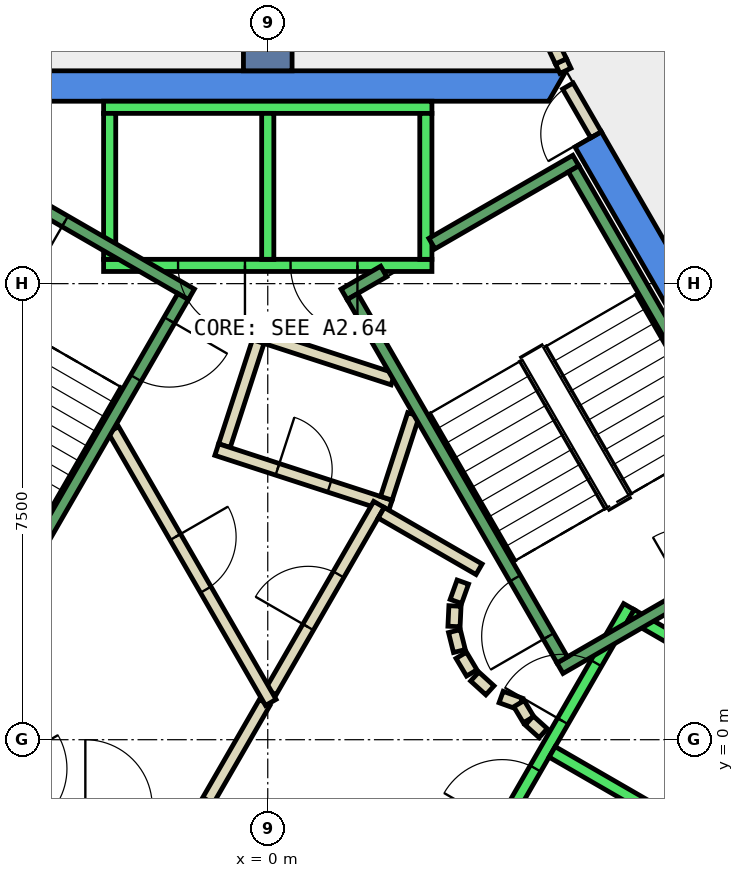
"""IFC4 building model, lengths in metres.
Left out: names, types, materials, properties, quantities, classifications, styles, units other than length and angle.
Written with IfcOpenShell. Run it as: python <this file> out.ifc"""

import sys

from ifc_helpers import new_model, si_unit, direction, frame, frame_2d, origin, place, context, subcontext, project, spatial, polyline, rectangle, outline, extrude, element, fill, save


model = new_model("IFC4")
c1 = context("Model", 3, precision=1e-05, world=origin(), true_north=direction((0.0, 1.0)))
c2 = subcontext(c1, "Body", "Model", "MODEL_VIEW")
j1 = project(units=[si_unit("LENGTHUNIT", "METRE"), si_unit("PLANEANGLEUNIT", "RADIAN")], contexts=[c1])
p1 = place(None, origin())
s1 = spatial("IfcSite", under=j1, at=p1, CompositionType="ELEMENT")
p2 = place(p1, origin())
s2 = spatial("IfcBuilding", under=s1, at=p2, CompositionType="ELEMENT")
p3 = place(p2, frame((0.0, 0.0, 304.4)))
s3 = spatial("IfcBuildingStorey", under=s2, at=p3, CompositionType="ELEMENT", Elevation=304.4)
p4 = place(p3, frame((0.0, 0.0, -0.34)))
e1 = element("IfcWall", 1, at=p4, inside=s3, PredefinedType="SHEAR", context=c2, shape_type="SweptSolid", body=[
    extrude(outline(polyline([(5.486, 9.998), (5.053, 9.748), (9.238, 2.5), (9.815, 2.5), (5.486, 9.998)])), origin(), (0.0, 0.0, 1.0), 3.6),
])
p5 = place(p3, frame((0.0, 0.0, -0.34)))
e2 = element("IfcWall", 2, at=p5, inside=s3, PredefinedType="SHEAR", context=c2, shape_type="SweptSolid", body=[
    extrude(outline(polyline([(4.907, 11.0), (-4.907, 11.0), (-4.619, 10.5), (4.619, 10.5), (4.907, 11.0)])), origin(), (0.0, 0.0, 1.0), 3.6),
])
p6 = place(p3, frame((0.0, 0.0, -0.34)))
e3 = element("IfcWall", 3, at=p6, inside=s3, PredefinedType="SHEAR", context=c2, shape_type="SweptSolid", body=[
    extrude(outline(polyline([(4.907, -6.0), (9.815, 2.5), (9.238, 2.5), (4.619, -5.5), (4.907, -6.0)])), origin(), (0.0, 0.0, 1.0), 3.6),
])
p7 = place(p3, frame((0.0, 11.0, -0.34), z_axis=(0.0, 0.0, 1.0), x_axis=(0.0, 1.0, 0.0)))
e4 = element("IfcWall", 4, at=p7, inside=s3, PredefinedType="SHEAR", context=c2, shape_type="SweptSolid", body=[
    extrude(rectangle(XDim=9.0, YDim=0.8, at=frame_2d((4.5, 0.0))), origin(), (0.0, 0.0, 1.0), 3.6),
])
p8 = place(p3, frame((2.06, 5.931, 0.0), z_axis=(0.0, 0.0, 1.0), x_axis=(-0.95092855133, 0.309410552932, 0.0)))
e5 = element("IfcWall", 5, at=p8, inside=s3, PredefinedType="PARTITIONING", context=c2, shape_type="SweptSolid", body=[
    extrude(rectangle(XDim=2.399, YDim=0.2, at=frame_2d((1.199, 0.0))), origin(), (0.0, 0.0, 1.0), 3.26),
])
p9 = place(p3, frame((-0.157, 6.547, 0.0), z_axis=(0.0, 0.0, 1.0), x_axis=(-0.308813127339, -0.951122732555, 0.0)))
e6 = element("IfcWall", 6, at=p9, inside=s3, PredefinedType="PARTITIONING", context=c2, shape_type="SweptSolid", body=[
    extrude(rectangle(XDim=1.8, YDim=0.2, at=frame_2d((0.9, 0.0))), origin(), (0.0, 0.0, 1.0), 3.26),
])
p10 = place(p3, frame((-0.839, 4.771, 0.0), z_axis=(0.0, 0.0, 1.0), x_axis=(0.950961084355, -0.309310549515, 0.0)))
e7 = element("IfcWall", 7, at=p10, inside=s3, PredefinedType="PARTITIONING", context=c2, shape_type="SweptSolid", body=[
    extrude(rectangle(XDim=3.0, YDim=0.2, at=frame_2d((1.5, 0.0))), origin(), (0.0, 0.0, 1.0), 3.26),
])
p11 = place(p10, frame((1.05, 0.0, 0.0)))
e8 = element("IfcOpeningElement", 8, at=p11, cuts=e7, PredefinedType="OPENING", context=c2, shape_type="SweptSolid", body=[
    extrude(rectangle(XDim=0.9, YDim=2.1, at=frame_2d((0.45, 1.05))), frame((0.0, 0.11, 0.0), z_axis=(0.0, -1.0, 0.0), x_axis=(1.0, 0.0, 0.0)), (0.0, 0.0, 1.0), 0.22),
])
p12 = place(p3, frame((1.95, 3.97, 0.0), z_axis=(0.0, 0.0, 1.0), x_axis=(0.308583003896, 0.951197418892, 0.0)))
e9 = element("IfcWall", 9, at=p12, inside=s3, PredefinedType="PARTITIONING", context=c2, shape_type="SweptSolid", body=[
    extrude(rectangle(XDim=1.449, YDim=0.2, at=frame_2d((0.724, 0.0))), origin(), (0.0, 0.0, 1.0), 3.26),
])
p13 = place(p3, frame((4.896, 11.0, 0.0), z_axis=(0.0, 0.0, 1.0), x_axis=(-0.428451014387, 0.903565010539, 0.0)))
e10 = element("IfcWall", 10, at=p13, inside=s3, PredefinedType="PARTITIONING", context=c2, shape_type="SweptSolid", body=[
    extrude(rectangle(XDim=0.173, YDim=0.2, at=frame_2d((0.086, 0.0))), origin(), (0.0, 0.0, 1.0), 2.4),
])
p14 = place(p3, frame((-2.969, 15.033, 0.0), z_axis=(0.0, 0.0, 1.0), x_axis=(-0.526330241425, -0.85028023437, 0.0)))
e11 = element("IfcWall", 11, at=p14, inside=s3, PredefinedType="PARTITIONING", context=c2, shape_type="SweptSolid", body=[
    extrude(rectangle(XDim=4.828, YDim=0.2, at=frame_2d((2.414, 0.0))), origin(), (0.0, 0.0, 1.0), 3.26),
])
p15 = place(p14, frame((1.514, 0.0, 0.0)))
e12 = element("IfcOpeningElement", 12, at=p15, cuts=e11, PredefinedType="OPENING", context=c2, shape_type="SweptSolid", body=[
    extrude(rectangle(XDim=1.8, YDim=2.1, at=frame_2d((0.9, 1.05))), frame((0.0, 0.11, 0.0), z_axis=(0.0, -1.0, 0.0), x_axis=(1.0, 0.0, 0.0)), (0.0, 0.0, 1.0), 0.22),
])
p16 = place(p3, frame((-0.982, -1.0, 0.0), z_axis=(0.0, 0.0, 1.0), x_axis=(0.50024047865, 0.865886518847, 0.0)))
e13 = element("IfcWall", 13, at=p16, inside=s3, PredefinedType="PARTITIONING", context=c2, shape_type="SweptSolid", body=[
    extrude(rectangle(XDim=1.863, YDim=0.2, at=frame_2d((0.931, 0.0))), origin(), (0.0, 0.0, 1.0), 3.26),
])
p17 = place(p3, frame((0.05, 0.787, 0.0), z_axis=(0.0, 0.0, 1.0), x_axis=(0.499954076797, 0.866051915934, 0.0)))
e14 = element("IfcWall", 14, at=p17, inside=s3, PredefinedType="PARTITIONING", context=c2, shape_type="SweptSolid", body=[
    extrude(rectangle(XDim=3.558, YDim=0.2, at=frame_2d((1.779, 0.0))), origin(), (0.0, 0.0, 1.0), 3.26),
])
p18 = place(p17, frame((1.229, 0.0, 0.0)))
e15 = element("IfcOpeningElement", 15, at=p18, cuts=e14, PredefinedType="OPENING", context=c2, shape_type="SweptSolid", body=[
    extrude(rectangle(XDim=1.0, YDim=2.1, at=frame_2d((0.5, 1.05))), frame((0.0, 0.11, 0.0), z_axis=(0.0, -1.0, 0.0), x_axis=(1.0, 0.0, 0.0)), (0.0, 0.0, 1.0), 0.22),
])
p19 = place(p3, frame((1.866, 3.732, 0.0), z_axis=(0.0, 0.0, 1.0), x_axis=(0.866043361281, -0.499968895414, 0.0)))
e16 = element("IfcWall", 16, at=p19, inside=s3, PredefinedType="PARTITIONING", context=c2, shape_type="SweptSolid", body=[
    extrude(rectangle(XDim=1.858, YDim=0.2, at=frame_2d((0.929, 0.0))), origin(), (0.0, 0.0, 1.0), 3.26),
])
p20 = place(p3, frame((3.208, 2.592, 0.0), z_axis=(0.0, 0.0, 1.0), x_axis=(-0.337388820924, -0.941365382578, 0.0)))
e17 = element("IfcWall", 17, at=p20, inside=s3, PredefinedType="PARTITIONING", context=c2, shape_type="SweptSolid", body=[
    extrude(rectangle(XDim=0.338, YDim=0.2, at=frame_2d((0.169, 0.0))), origin(), (0.0, 0.0, 1.0), 3.26),
])
p21 = place(p3, frame((3.079, 2.199, 0.0), z_axis=(0.0, 0.0, 1.0), x_axis=(-0.047771483479, -0.998858290933, 0.0)))
e18 = element("IfcWall", 18, at=p21, inside=s3, PredefinedType="PARTITIONING", context=c2, shape_type="SweptSolid", body=[
    extrude(rectangle(XDim=0.337, YDim=0.2, at=frame_2d((0.169, 0.0))), origin(), (0.0, 0.0, 1.0), 3.26),
])
p22 = place(p3, frame((3.07, 1.786, 0.0), z_axis=(0.0, 0.0, 1.0), x_axis=(0.242705583207, -0.970099994784, 0.0)))
e19 = element("IfcWall", 19, at=p22, inside=s3, PredefinedType="PARTITIONING", context=c2, shape_type="SweptSolid", body=[
    extrude(rectangle(XDim=0.338, YDim=0.2, at=frame_2d((0.169, 0.0))), origin(), (0.0, 0.0, 1.0), 3.26),
])
for number, where, z_axis, x_axis in (
    (20, (3.182, 1.388, 0.0), (0.0, 0.0, 1.0), (0.512, -0.859, 0.0)),
    (21, (3.404, 1.039, 0.0), (0.0, 0.0, 1.0), (0.74, -0.672, 0.0)),
):
    element("IfcWall", number, at=place(p3, frame(where, z_axis=z_axis, x_axis=x_axis)), inside=s3, PredefinedType="PARTITIONING", context=c2, shape_type="SweptSolid", body=[
        extrude(rectangle(XDim=0.338, YDim=0.2, at=frame_2d((0.169, 0.0))), origin(), (0.0, 0.0, 1.0), 3.26),
    ])
p23 = place(p3, frame((3.838, 0.702, 0.0), z_axis=(0.0, 0.0, 1.0), x_axis=(0.941035081519, -0.338308993895, 0.0)))
e22 = element("IfcWall", 22, at=p23, inside=s3, PredefinedType="PARTITIONING", context=c2, shape_type="SweptSolid", body=[
    extrude(rectangle(XDim=0.337, YDim=0.2, at=frame_2d((0.168, 0.0))), origin(), (0.0, 0.0, 1.0), 3.26),
])
p24 = place(p3, frame((4.132, 0.593, 0.0), z_axis=(0.0, 0.0, 1.0), x_axis=(0.513561617048, -0.858052717201, 0.0)))
e23 = element("IfcWall", 23, at=p24, inside=s3, PredefinedType="PARTITIONING", context=c2, shape_type="SweptSolid", body=[
    extrude(rectangle(XDim=0.308, YDim=0.2, at=frame_2d((0.154, 0.0))), origin(), (0.0, 0.0, 1.0), 3.26),
])
p25 = place(p3, frame((4.301, 0.315, 0.0), z_axis=(0.0, 0.0, 1.0), x_axis=(0.741798017506, -0.670623367639, 0.0)))
e24 = element("IfcWall", 24, at=p25, inside=s3, PredefinedType="PARTITIONING", context=c2, shape_type="SweptSolid", body=[
    extrude(rectangle(XDim=0.309, YDim=0.2, at=frame_2d((0.154, 0.0))), origin(), (0.0, 0.0, 1.0), 3.26),
])
p26 = place(p3, frame((-2.54, 5.1, 0.0), z_axis=(0.0, 0.0, 1.0), x_axis=(0.499925051871, -0.866068670783, 0.0)))
e25 = element("IfcWall", 25, at=p26, inside=s3, PredefinedType="PARTITIONING", context=c2, shape_type="SweptSolid", body=[
    extrude(rectangle(XDim=5.181, YDim=0.2, at=frame_2d((2.59, 0.0))), origin(), (0.0, 0.0, 1.0), 3.26),
])
p27 = place(p26, frame((2.04, 0.0, 0.0)))
e26 = element("IfcOpeningElement", 26, at=p27, cuts=e25, PredefinedType="OPENING", context=c2, shape_type="SweptSolid", body=[
    extrude(rectangle(XDim=1.0, YDim=2.1, at=frame_2d((0.5, 1.05))), frame((0.0, 0.11, 0.0), z_axis=(0.0, -1.0, 0.0), x_axis=(1.0, 0.0, 0.0)), (0.0, 0.0, 1.0), 0.22),
])
p28 = place(p3, frame((5.399, 9.948, 0.0), z_axis=(0.0, 0.0, 1.0), x_axis=(-0.499882215713, 0.866093395895, 0.0)))
e27 = element("IfcWall", 27, at=p28, inside=s3, PredefinedType="PARTITIONING", context=c2, shape_type="SweptSolid", body=[
    extrude(rectangle(XDim=0.926, YDim=0.2, at=frame_2d((0.463, 0.0))), origin(), (0.0, 0.0, 1.0), 2.4),
])
p29 = place(p28, frame((0.017, 0.0, 0.0)))
e28 = element("IfcOpeningElement", 28, at=p29, cuts=e27, PredefinedType="OPENING", context=c2, shape_type="SweptSolid", body=[
    extrude(rectangle(XDim=0.9, YDim=2.1, at=frame_2d((0.45, 1.05))), frame((0.0, 0.11, 0.0), z_axis=(0.0, -1.0, 0.0), x_axis=(1.0, 0.0, 0.0)), (0.0, 0.0, 1.0), 0.22),
])
p30 = place(p3, frame((4.822, 11.156, 0.0), z_axis=(0.0, 0.0, 1.0), x_axis=(-0.429057973289, 0.903276953961, 0.0)))
e29 = element("IfcWall", 29, at=p30, inside=s3, PredefinedType="PARTITIONING", context=c2, shape_type="SweptSolid", body=[
    extrude(rectangle(XDim=4.298, YDim=0.2, at=frame_2d((2.149, 0.0))), origin(), (0.0, 0.0, 1.0), 3.26),
])
p31 = place(p3, frame((2.7, 7.8, 0.0), z_axis=(0.0, 0.0, 1.0), x_axis=(-1.0, 0.0, 0.0)))
e30 = element("IfcWall", 30, at=p31, inside=s3, PredefinedType="STANDARD", context=c2, shape_type="SweptSolid", body=[
    extrude(rectangle(XDim=5.4, YDim=0.2, at=frame_2d((2.7, 0.0))), origin(), (0.0, 0.0, 1.0), 3.26),
])
p32 = place(p31, frame((1.225, 0.0, 0.0)))
e31 = element("IfcOpeningElement", 31, at=p32, cuts=e30, PredefinedType="OPENING", context=c2, shape_type="SweptSolid", body=[
    extrude(rectangle(XDim=1.1, YDim=2.1, at=frame_2d((0.55, 1.05))), frame((0.0, 0.11, 0.0), z_axis=(0.0, -1.0, 0.0), x_axis=(1.0, 0.0, 0.0)), (0.0, 0.0, 1.0), 0.22),
])
p33 = place(p31, frame((3.075, 0.0, 0.0)))
e32 = element("IfcOpeningElement", 32, at=p33, cuts=e30, PredefinedType="OPENING", context=c2, shape_type="SweptSolid", body=[
    extrude(rectangle(XDim=1.1, YDim=2.1, at=frame_2d((0.55, 1.05))), frame((0.0, 0.11, 0.0), z_axis=(0.0, -1.0, 0.0), x_axis=(1.0, 0.0, 0.0)), (0.0, 0.0, 1.0), 0.22),
])
p34 = place(p3, frame((2.7, 10.4, 0.0), z_axis=(0.0, 0.0, 1.0), x_axis=(-1.0, 0.0, 0.0)))
e33 = element("IfcWall", 33, at=p34, inside=s3, PredefinedType="STANDARD", context=c2, shape_type="SweptSolid", body=[
    extrude(rectangle(XDim=5.4, YDim=0.2, at=frame_2d((2.7, 0.0))), origin(), (0.0, 0.0, 1.0), 3.26),
])
for number, where, z_axis, x_axis in (
    (34, (2.6, 7.9, 0.0), (0.0, 0.0, 1.0), (0.0, 1.0, 0.0)),
    (35, (0.0, 7.9, 0.0), (0.0, 0.0, 1.0), (0.0, 1.0, 0.0)),
    (36, (-2.6, 7.9, 0.0), (0.0, 0.0, 1.0), (0.0, 1.0, 0.0)),
):
    element("IfcWall", number, at=place(p3, frame(where, z_axis=z_axis, x_axis=x_axis)), inside=s3, PredefinedType="STANDARD", context=c2, shape_type="SweptSolid", body=[
        extrude(rectangle(XDim=2.4, YDim=0.2, at=frame_2d((1.2, 0.0))), origin(), (0.0, 0.0, 1.0), 3.26),
    ])
p35 = place(p3, frame((-5.94, 2.188, 0.0), z_axis=(0.0, 0.0, 1.0), x_axis=(0.500034260056, -0.866005622828, 0.0)))
e37 = element("IfcWall", 37, at=p35, inside=s3, PredefinedType="STANDARD", context=c2, shape_type="SweptSolid", body=[
    extrude(rectangle(XDim=5.399, YDim=0.2, at=frame_2d((2.7, 0.0))), origin(), (0.0, 0.0, 1.0), 3.26),
])
p36 = place(p35, frame((3.075, 0.0, 0.0)))
e38 = element("IfcOpeningElement", 38, at=p36, cuts=e37, PredefinedType="OPENING", context=c2, shape_type="SweptSolid", body=[
    extrude(rectangle(XDim=1.1, YDim=2.1, at=frame_2d((0.55, 1.05))), frame((0.0, 0.11, 0.0), z_axis=(0.0, -1.0, 0.0), x_axis=(1.0, 0.0, 0.0)), (0.0, 0.0, 1.0), 0.22),
])
p37 = place(p35, frame((1.225, 0.0, 0.0)))
e39 = element("IfcOpeningElement", 39, at=p37, cuts=e37, PredefinedType="OPENING", context=c2, shape_type="SweptSolid", body=[
    extrude(rectangle(XDim=1.1, YDim=2.1, at=frame_2d((0.55, 1.05))), frame((0.0, 0.11, 0.0), z_axis=(0.0, -1.0, 0.0), x_axis=(1.0, 0.0, 0.0)), (0.0, 0.0, 1.0), 0.22),
])
p38 = place(p3, frame((3.24, -2.488, 0.0), z_axis=(0.0, 0.0, 1.0), x_axis=(0.500034260056, 0.866005622828, 0.0)))
e40 = element("IfcWall", 40, at=p38, inside=s3, PredefinedType="STANDARD", context=c2, shape_type="SweptSolid", body=[
    extrude(rectangle(XDim=5.399, YDim=0.2, at=frame_2d((2.7, 0.0))), origin(), (0.0, 0.0, 1.0), 3.26),
])
p39 = place(p38, frame((3.225, 0.0, 0.0)))
e41 = element("IfcOpeningElement", 41, at=p39, cuts=e40, PredefinedType="OPENING", context=c2, shape_type="SweptSolid", body=[
    extrude(rectangle(XDim=1.1, YDim=2.1, at=frame_2d((0.55, 1.05))), frame((0.0, 0.11, 0.0), z_axis=(0.0, -1.0, 0.0), x_axis=(1.0, 0.0, 0.0)), (0.0, 0.0, 1.0), 0.22),
])
p40 = place(p38, frame((1.225, 0.0, 0.0)))
e42 = element("IfcOpeningElement", 42, at=p40, cuts=e40, PredefinedType="OPENING", context=c2, shape_type="SweptSolid", body=[
    extrude(rectangle(XDim=1.1, YDim=2.1, at=frame_2d((0.55, 1.05))), frame((0.0, 0.11, 0.0), z_axis=(0.0, -1.0, 0.0), x_axis=(1.0, 0.0, 0.0)), (0.0, 0.0, 1.0), 0.22),
])
p41 = place(p3, frame((5.492, -3.788, 0.0), z_axis=(0.0, 0.0, 1.0), x_axis=(0.500034260056, 0.866005622828, 0.0)))
e43 = element("IfcWall", 43, at=p41, inside=s3, PredefinedType="STANDARD", context=c2, shape_type="SweptSolid", body=[
    extrude(rectangle(XDim=5.399, YDim=0.2, at=frame_2d((2.7, 0.0))), origin(), (0.0, 0.0, 1.0), 3.26),
])
for number, where, z_axis, x_axis in (
    (44, (4.677, -0.2, 0.0), (0.0, 0.0, 1.0), (0.866, -0.5, 0.0)),
    (45, (5.977, 2.052, 0.0), (0.0, 0.0, 1.0), (0.866, -0.5, 0.0)),
):
    element("IfcWall", number, at=place(p3, frame(where, z_axis=z_axis, x_axis=x_axis)), inside=s3, PredefinedType="STANDARD", context=c2, shape_type="SweptSolid", body=[
        extrude(rectangle(XDim=2.399, YDim=0.2, at=frame_2d((1.2, 0.0))), origin(), (0.0, 0.0, 1.0), 3.26),
    ])
p42 = place(p3, frame((4.806, 1.176, 0.0), z_axis=(0.0, 0.0, 1.0), x_axis=(0.866059941101, 0.499940174841, 0.0)))
e46 = element("IfcWall", 46, at=p42, inside=s3, PredefinedType="STANDARD", context=c2, shape_type="SweptSolid", body=[
    extrude(rectangle(XDim=4.4, YDim=0.2, at=frame_2d((2.2, 0.0))), origin(), (0.0, 0.0, 1.0), 3.26),
])
p43 = place(p42, frame((2.4, 0.0, 0.0)))
e47 = element("IfcOpeningElement", 47, at=p43, cuts=e46, PredefinedType="OPENING", context=c2, shape_type="SweptSolid", body=[
    extrude(rectangle(XDim=1.1, YDim=2.2, at=frame_2d((0.55, 1.1))), frame((0.0, 0.11, 0.0), z_axis=(0.0, -1.0, 0.0), x_axis=(1.0, 0.0, 0.0)), (0.0, 0.0, 1.0), 0.22),
])
p44 = place(p3, frame((2.7, 8.158, 0.0), z_axis=(0.0, 0.0, 1.0), x_axis=(0.86611865017, 0.499838457731, 0.0)))
e48 = element("IfcWall", 48, at=p44, inside=s3, PredefinedType="STANDARD", context=c2, shape_type="SweptSolid", body=[
    extrude(rectangle(XDim=2.733, YDim=0.2, at=frame_2d((1.366, 0.0))), origin(), (0.0, 0.0, 1.0), 3.26),
])
p45 = place(p3, frame((1.256, 7.324, 0.0), z_axis=(0.0, 0.0, 1.0), x_axis=(0.865915093549, 0.500191014278, 0.0)))
e49 = element("IfcWall", 49, at=p45, inside=s3, PredefinedType="STANDARD", context=c2, shape_type="SweptSolid", body=[
    extrude(rectangle(XDim=0.752, YDim=0.2, at=frame_2d((0.376, 0.0))), origin(), (0.0, 0.0, 1.0), 3.26),
])
p46 = place(p3, frame((4.843, 1.312, 0.0), z_axis=(0.0, 0.0, 1.0), x_axis=(-0.499963383562, 0.866046543262, 0.0)))
e50 = element("IfcWall", 50, at=p46, inside=s3, PredefinedType="STANDARD", context=c2, shape_type="SweptSolid", body=[
    extrude(rectangle(XDim=6.9, YDim=0.2, at=frame_2d((3.45, 0.0))), origin(), (0.0, 0.0, 1.0), 3.26),
])
p47 = place(p46, frame((0.45, 0.0, 0.0)))
e51 = element("IfcOpeningElement", 51, at=p47, cuts=e50, PredefinedType="OPENING", context=c2, shape_type="SweptSolid", body=[
    extrude(rectangle(XDim=1.1, YDim=2.2, at=frame_2d((0.55, 1.1))), frame((0.0, 0.11, 0.0), z_axis=(0.0, -1.0, 0.0), x_axis=(1.0, 0.0, 0.0)), (0.0, 0.0, 1.0), 0.22),
])
p48 = place(p3, frame((8.48, 3.412, 0.0), z_axis=(0.0, 0.0, 1.0), x_axis=(-0.499978703459, 0.866037698999, 0.0)))
e52 = element("IfcWall", 52, at=p48, inside=s3, PredefinedType="STANDARD", context=c2, shape_type="SweptSolid", body=[
    extrude(rectangle(XDim=6.9, YDim=0.2, at=frame_2d((3.45, 0.0))), origin(), (0.0, 0.0, 1.0), 3.26),
])
p49 = place(p3, frame((-1.256, 7.324, 0.0), z_axis=(0.0, 0.0, 1.0), x_axis=(-0.866046073146, 0.499964197906, 0.0)))
e53 = element("IfcWall", 53, at=p49, inside=s3, PredefinedType="STANDARD", context=c2, shape_type="SweptSolid", body=[
    extrude(rectangle(XDim=4.4, YDim=0.2, at=frame_2d((2.2, 0.0))), origin(), (0.0, 0.0, 1.0), 3.26),
])
p50 = place(p49, frame((2.4, 0.0, 0.0)))
e54 = element("IfcOpeningElement", 54, at=p50, cuts=e53, PredefinedType="OPENING", context=c2, shape_type="SweptSolid", body=[
    extrude(rectangle(XDim=1.1, YDim=2.2, at=frame_2d((0.55, 1.1))), frame((0.0, 0.11, 0.0), z_axis=(0.0, -1.0, 0.0), x_axis=(1.0, 0.0, 0.0)), (0.0, 0.0, 1.0), 0.22),
])
p51 = place(p3, frame((-1.393, 7.288, 0.0), z_axis=(0.0, 0.0, 1.0), x_axis=(-0.499963383562, -0.866046543262, 0.0)))
e55 = element("IfcWall", 55, at=p51, inside=s3, PredefinedType="STANDARD", context=c2, shape_type="SweptSolid", body=[
    extrude(rectangle(XDim=6.9, YDim=0.2, at=frame_2d((3.45, 0.0))), origin(), (0.0, 0.0, 1.0), 3.26),
])
p52 = place(p51, frame((0.45, 0.0, 0.0)))
e56 = element("IfcOpeningElement", 56, at=p52, cuts=e55, PredefinedType="OPENING", context=c2, shape_type="SweptSolid", body=[
    extrude(rectangle(XDim=1.1, YDim=2.2, at=frame_2d((0.55, 1.1))), frame((0.0, 0.11, 0.0), z_axis=(0.0, -1.0, 0.0), x_axis=(1.0, 0.0, 0.0)), (0.0, 0.0, 1.0), 0.22),
])
p53 = place(p18, origin())
e57 = element("IfcDoor", 57, at=p53, inside=s3, OperationType="SINGLE_SWING_RIGHT", PredefinedType="DOOR", context=c2, shape_type="SweptSolid", body=[
    extrude(rectangle(XDim=1.0, YDim=2.1, at=frame_2d((0.5, 1.05))), frame((0.0, 0.025, 0.0), z_axis=(0.0, -1.0, 0.0), x_axis=(1.0, 0.0, 0.0)), (0.0, 0.0, 1.0), 0.05),
])
fill(e15, e57)
p54 = place(p27, origin())
e58 = element("IfcDoor", 58, at=p54, inside=s3, OperationType="SINGLE_SWING_RIGHT", PredefinedType="DOOR", context=c2, shape_type="SweptSolid", body=[
    extrude(rectangle(XDim=1.0, YDim=2.1, at=frame_2d((0.5, 1.05))), frame((0.0, 0.025, 0.0), z_axis=(0.0, -1.0, 0.0), x_axis=(1.0, 0.0, 0.0)), (0.0, 0.0, 1.0), 0.05),
])
fill(e26, e58)
p55 = place(p11, origin())
e59 = element("IfcDoor", 59, at=p55, inside=s3, OperationType="SINGLE_SWING_LEFT", PredefinedType="DOOR", context=c2, shape_type="SweptSolid", body=[
    extrude(rectangle(XDim=0.9, YDim=2.1, at=frame_2d((0.45, 1.05))), frame((0.0, 0.025, 0.0), z_axis=(0.0, -1.0, 0.0), x_axis=(1.0, 0.0, 0.0)), (0.0, 0.0, 1.0), 0.05),
])
fill(e8, e59)
p56 = place(p29, origin())
e60 = element("IfcDoor", 60, at=p56, inside=s3, OperationType="SINGLE_SWING_LEFT", PredefinedType="DOOR", context=c2, shape_type="SweptSolid", body=[
    extrude(rectangle(XDim=0.9, YDim=2.1, at=frame_2d((0.45, 1.05))), frame((0.0, 0.025, 0.0), z_axis=(0.0, -1.0, 0.0), x_axis=(1.0, 0.0, 0.0)), (0.0, 0.0, 1.0), 0.05),
])
fill(e28, e60)
p57 = place(p32, origin())
e61 = element("IfcDoor", 61, at=p57, inside=s3, OperationType="SLIDING_TO_LEFT", PredefinedType="DOOR", context=c2, shape_type="SweptSolid", body=[
    extrude(rectangle(XDim=1.1, YDim=2.1, at=frame_2d((0.55, 1.05))), frame((0.0, 0.025, 0.0), z_axis=(0.0, -1.0, 0.0), x_axis=(1.0, 0.0, 0.0)), (0.0, 0.0, 1.0), 0.05),
])
fill(e31, e61)
p58 = place(p33, origin())
e62 = element("IfcDoor", 62, at=p58, inside=s3, OperationType="SLIDING_TO_LEFT", PredefinedType="DOOR", context=c2, shape_type="SweptSolid", body=[
    extrude(rectangle(XDim=1.1, YDim=2.1, at=frame_2d((0.55, 1.05))), frame((0.0, 0.025, 0.0), z_axis=(0.0, -1.0, 0.0), x_axis=(1.0, 0.0, 0.0)), (0.0, 0.0, 1.0), 0.05),
])
fill(e32, e62)
p59 = place(p39, origin())
e63 = element("IfcDoor", 63, at=p59, inside=s3, OperationType="SLIDING_TO_LEFT", PredefinedType="DOOR", context=c2, shape_type="SweptSolid", body=[
    extrude(rectangle(XDim=1.1, YDim=2.1, at=frame_2d((0.55, 1.05))), frame((0.0, 0.025, 0.0), z_axis=(0.0, -1.0, 0.0), x_axis=(1.0, 0.0, 0.0)), (0.0, 0.0, 1.0), 0.05),
])
fill(e41, e63)
p60 = place(p40, origin())
e64 = element("IfcDoor", 64, at=p60, inside=s3, OperationType="SLIDING_TO_LEFT", PredefinedType="DOOR", context=c2, shape_type="SweptSolid", body=[
    extrude(rectangle(XDim=1.1, YDim=2.1, at=frame_2d((0.55, 1.05))), frame((0.0, 0.025, 0.0), z_axis=(0.0, -1.0, 0.0), x_axis=(1.0, 0.0, 0.0)), (0.0, 0.0, 1.0), 0.05),
])
fill(e42, e64)
p61 = place(p47, origin())
e65 = element("IfcDoor", 65, at=p61, inside=s3, OperationType="SINGLE_SWING_LEFT", PredefinedType="DOOR", context=c2, shape_type="SweptSolid", body=[
    extrude(rectangle(XDim=1.1, YDim=2.2, at=frame_2d((0.55, 1.1))), frame((0.0, 0.025, 0.0), z_axis=(0.0, -1.0, 0.0), x_axis=(1.0, 0.0, 0.0)), (0.0, 0.0, 1.0), 0.05),
])
fill(e51, e65)
p62 = place(p52, origin())
e66 = element("IfcDoor", 66, at=p62, inside=s3, OperationType="SINGLE_SWING_LEFT", PredefinedType="DOOR", context=c2, shape_type="SweptSolid", body=[
    extrude(rectangle(XDim=1.1, YDim=2.2, at=frame_2d((0.55, 1.1))), frame((0.0, 0.025, 0.0), z_axis=(0.0, -1.0, 0.0), x_axis=(1.0, 0.0, 0.0)), (0.0, 0.0, 1.0), 0.05),
])
fill(e56, e66)
p63 = place(p50, origin())
e67 = element("IfcDoor", 67, at=p63, inside=s3, OperationType="SINGLE_SWING_LEFT", PredefinedType="DOOR", context=c2, shape_type="SweptSolid", body=[
    extrude(rectangle(XDim=1.1, YDim=2.2, at=frame_2d((0.55, 1.1))), frame((0.0, 0.025, 0.0), z_axis=(0.0, -1.0, 0.0), x_axis=(1.0, 0.0, 0.0)), (0.0, 0.0, 1.0), 0.05),
])
fill(e54, e67)
save(model, sys.argv[1])
